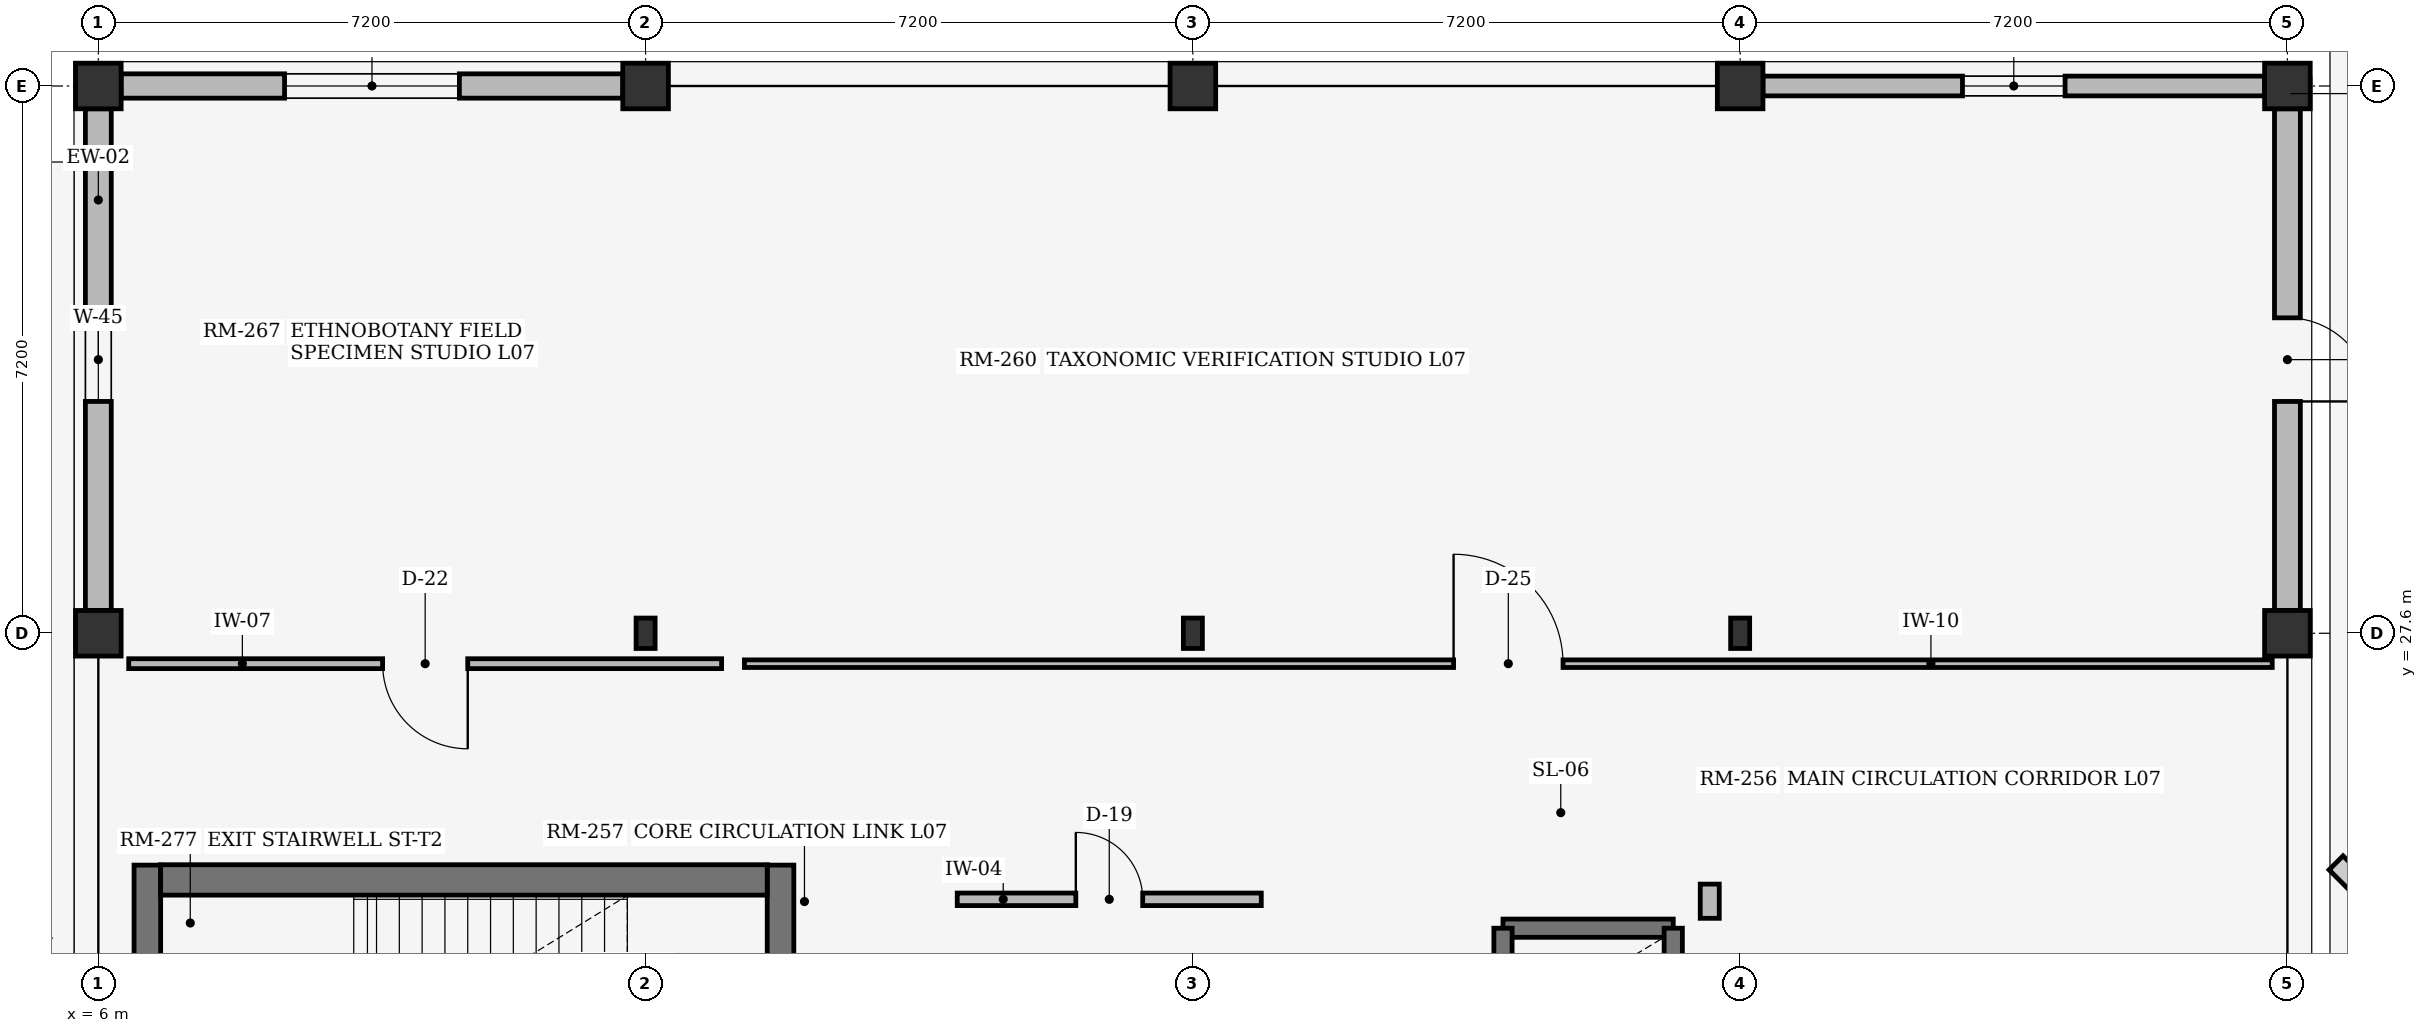
"""IFC4 building model, lengths in metres.
Left out: names, types, materials, properties, quantities, classifications, styles, units other than length and angle.
Written with IfcOpenShell. Run it as: python <this file> out.ifc"""

import sys

from ifc_helpers import new_model, si_unit, direction, frame, frame_2d, origin, origin_2d, place, context, subcontext, project, spatial, rectangle, i_section, extrude, element, fill, save


model = new_model("IFC4")
c1 = context("Model", 3, precision=1e-05, world=origin(), true_north=direction((0.0, 1.0)))
c2 = subcontext(c1, "Body", "Model", "MODEL_VIEW")
j1 = project(units=[si_unit("LENGTHUNIT", "METRE"), si_unit("PLANEANGLEUNIT", "RADIAN")], contexts=[c1])
p1 = place(None, origin())
s1 = spatial("IfcSite", under=j1, at=p1, CompositionType="ELEMENT")
p2 = place(p1, origin())
s2 = spatial("IfcBuilding", under=s1, at=p2, CompositionType="ELEMENT")
p3 = place(p2, frame((0.0, 0.0, 28.8)))
s3 = spatial("IfcBuildingStorey", under=s2, at=p3, CompositionType="ELEMENT", Elevation=28.8)
for number, where, z_axis, x_axis in (
    (1, (6.0, 27.6, 0.0), (0.0, 0.0, 1.0), (1.0, 0.0, 0.0)),
    (2, (6.0, 34.8, 0.0), (0.0, 0.0, 1.0), (1.0, 0.0, 0.0)),
):
    element("IfcColumn", number, at=place(p3, frame(where, z_axis=z_axis, x_axis=x_axis)), inside=s3, PredefinedType="COLUMN", context=c2, shape_type="SweptSolid", body=[
        extrude(rectangle(XDim=0.6, YDim=0.6, at=origin_2d()), origin(), (0.0, 0.0, 1.0), 3.62),
    ])
p4 = place(p3, frame((13.2, 27.6, 0.0), z_axis=(0.0, 0.0, 1.0), x_axis=(1.0, 0.0, 0.0)))
e3 = element("IfcColumn", 3, at=p4, inside=s3, PredefinedType="COLUMN", context=c2, shape_type="SweptSolid", body=[
    extrude(i_section(OverallWidth=0.25, OverallDepth=0.4, WebThickness=0.01, FlangeThickness=0.013, at=origin_2d()), origin(), (0.0, 0.0, 1.0), 3.62),
])
p5 = place(p3, frame((13.2, 34.8, 0.0), z_axis=(0.0, 0.0, 1.0), x_axis=(1.0, 0.0, 0.0)))
e4 = element("IfcColumn", 4, at=p5, inside=s3, PredefinedType="COLUMN", context=c2, shape_type="SweptSolid", body=[
    extrude(rectangle(XDim=0.6, YDim=0.6, at=origin_2d()), origin(), (0.0, 0.0, 1.0), 3.62),
])
p6 = place(p3, frame((20.4, 27.6, 0.0), z_axis=(0.0, 0.0, 1.0), x_axis=(1.0, 0.0, 0.0)))
e5 = element("IfcColumn", 5, at=p6, inside=s3, PredefinedType="COLUMN", context=c2, shape_type="SweptSolid", body=[
    extrude(i_section(OverallWidth=0.25, OverallDepth=0.4, WebThickness=0.01, FlangeThickness=0.013, at=origin_2d()), origin(), (0.0, 0.0, 1.0), 3.62),
])
p7 = place(p3, frame((20.4, 34.8, 0.0), z_axis=(0.0, 0.0, 1.0), x_axis=(1.0, 0.0, 0.0)))
e6 = element("IfcColumn", 6, at=p7, inside=s3, PredefinedType="COLUMN", context=c2, shape_type="SweptSolid", body=[
    extrude(rectangle(XDim=0.6, YDim=0.6, at=origin_2d()), origin(), (0.0, 0.0, 1.0), 3.62),
])
p8 = place(p3, frame((27.6, 27.6, 0.0), z_axis=(0.0, 0.0, 1.0), x_axis=(1.0, 0.0, 0.0)))
e7 = element("IfcColumn", 7, at=p8, inside=s3, PredefinedType="COLUMN", context=c2, shape_type="SweptSolid", body=[
    extrude(i_section(OverallWidth=0.25, OverallDepth=0.4, WebThickness=0.01, FlangeThickness=0.013, at=origin_2d()), origin(), (0.0, 0.0, 1.0), 3.62),
])
for number, where, z_axis, x_axis in (
    (8, (27.6, 34.8, 0.0), (0.0, 0.0, 1.0), (1.0, 0.0, 0.0)),
    (9, (34.8, 27.6, 0.0), (0.0, 0.0, 1.0), (1.0, 0.0, 0.0)),
    (10, (34.8, 34.8, 0.0), (0.0, 0.0, 1.0), (1.0, 0.0, 0.0)),
):
    element("IfcColumn", number, at=place(p3, frame(where, z_axis=z_axis, x_axis=x_axis)), inside=s3, PredefinedType="COLUMN", context=c2, shape_type="SweptSolid", body=[
        extrude(rectangle(XDim=0.6, YDim=0.6, at=origin_2d()), origin(), (0.0, 0.0, 1.0), 3.62),
    ])
p9 = place(p3, frame((6.3, 34.8, 0.0), z_axis=(0.0, 0.0, 1.0), x_axis=(1.0, 0.0, 0.0)))
e11 = element("IfcWall", 11, at=p9, inside=s3, PredefinedType="STANDARD", context=c2, shape_type="SweptSolid", body=[
    extrude(rectangle(XDim=6.6, YDim=0.32, at=frame_2d((3.3, 0.0))), origin(), (0.0, 0.0, 1.0), 3.1),
])
p10 = place(p9, frame((2.15, 0.0, 0.75)))
e12 = element("IfcOpeningElement", 12, at=p10, cuts=e11, PredefinedType="OPENING", context=c2, shape_type="SweptSolid", body=[
    extrude(rectangle(XDim=2.3, YDim=1.35, at=frame_2d((1.15, 0.675))), frame((0.0, 0.17, 0.0), z_axis=(0.0, -1.0, 0.0), x_axis=(1.0, 0.0, 0.0)), (0.0, 0.0, 1.0), 0.34),
])
p11 = place(p3, frame((27.9, 34.8, 0.0), z_axis=(0.0, 0.0, 1.0), x_axis=(1.0, 0.0, 0.0)))
e13 = element("IfcWall", 13, at=p11, inside=s3, PredefinedType="STANDARD", context=c2, shape_type="SweptSolid", body=[
    extrude(rectangle(XDim=6.6, YDim=0.26, at=frame_2d((3.3, 0.0))), origin(), (0.0, 0.0, 1.0), 3.1),
])
p12 = place(p11, frame((2.625, 0.0, 0.75)))
e14 = element("IfcOpeningElement", 14, at=p12, cuts=e13, PredefinedType="OPENING", context=c2, shape_type="SweptSolid", body=[
    extrude(rectangle(XDim=1.35, YDim=1.5, at=frame_2d((0.675, 0.75))), frame((0.0, 0.14, 0.0), z_axis=(0.0, -1.0, 0.0), x_axis=(1.0, 0.0, 0.0)), (0.0, 0.0, 1.0), 0.28),
])
p13 = place(p3, frame((6.0, 27.9, 0.0), z_axis=(0.0, 0.0, 1.0), x_axis=(0.0, 1.0, 0.0)))
e15 = element("IfcWall", 15, at=p13, inside=s3, PredefinedType="STANDARD", context=c2, shape_type="SweptSolid", body=[
    extrude(rectangle(XDim=6.6, YDim=0.34, at=frame_2d((3.3, 0.0))), origin(), (0.0, 0.0, 1.0), 3.1),
])
p14 = place(p13, frame((2.75, 0.0, 0.75)))
e16 = element("IfcOpeningElement", 16, at=p14, cuts=e15, PredefinedType="OPENING", context=c2, shape_type="SweptSolid", body=[
    extrude(rectangle(XDim=1.1, YDim=1.25, at=frame_2d((0.55, 0.625))), frame((0.0, 0.18, 0.0), z_axis=(0.0, -1.0, 0.0), x_axis=(1.0, 0.0, 0.0)), (0.0, 0.0, 1.0), 0.36),
])
p15 = place(p3, frame((34.8, 27.9, 0.0), z_axis=(0.0, 0.0, 1.0), x_axis=(0.0, 1.0, 0.0)))
e17 = element("IfcWall", 17, at=p15, inside=s3, PredefinedType="STANDARD", context=c2, shape_type="SweptSolid", body=[
    extrude(rectangle(XDim=6.6, YDim=0.34, at=frame_2d((3.3, 0.0))), origin(), (0.0, 0.0, 1.0), 3.1),
])
p16 = place(p15, frame((2.75, 0.0, 0.0)))
e18 = element("IfcOpeningElement", 18, at=p16, cuts=e17, PredefinedType="OPENING", context=c2, shape_type="SweptSolid", body=[
    extrude(rectangle(XDim=1.1, YDim=2.15, at=frame_2d((0.55, 1.075))), frame((0.0, 0.18, 0.0), z_axis=(0.0, -1.0, 0.0), x_axis=(1.0, 0.0, 0.0)), (0.0, 0.0, 1.0), 0.36),
])
p17 = place(p3, frame((14.975, 24.55, 0.0), z_axis=(0.0, 0.0, 1.0), x_axis=(0.0, -1.0, 0.0)))
e19 = element("IfcWall", 19, at=p17, inside=s3, PredefinedType="SHEAR", context=c2, shape_type="SweptSolid", body=[
    extrude(rectangle(XDim=4.59, YDim=0.35, at=frame_2d((2.295, 0.0))), origin(), (0.0, 0.0, 1.0), 3.62),
])
p18 = place(p17, frame((1.72, 0.0, 0.0)))
e20 = element("IfcOpeningElement", 20, at=p18, cuts=e19, PredefinedType="OPENING", context=c2, shape_type="SweptSolid", body=[
    extrude(rectangle(XDim=1.15, YDim=2.2, at=frame_2d((0.575, 1.1))), frame((0.0, 0.185, 0.0), z_axis=(0.0, -1.0, 0.0), x_axis=(1.0, 0.0, 0.0)), (0.0, 0.0, 1.0), 0.37),
])
p19 = place(p3, frame((6.645, 24.55, 0.0), z_axis=(0.0, 0.0, 1.0), x_axis=(0.0, -1.0, 0.0)))
e21 = element("IfcWall", 21, at=p19, inside=s3, PredefinedType="SHEAR", context=c2, shape_type="SweptSolid", body=[
    extrude(rectangle(XDim=4.59, YDim=0.35, at=frame_2d((2.295, 0.0))), origin(), (0.0, 0.0, 1.0), 3.62),
])
p20 = place(p3, frame((14.8, 24.355, 0.0), z_axis=(0.0, 0.0, 1.0), x_axis=(-1.0, 0.0, 0.0)))
e22 = element("IfcWall", 22, at=p20, inside=s3, PredefinedType="SHEAR", context=c2, shape_type="SweptSolid", body=[
    extrude(rectangle(XDim=7.98, YDim=0.4, at=frame_2d((3.99, 0.0))), origin(), (0.0, 0.0, 1.0), 3.62),
])
p21 = place(p3, frame((24.48, 23.72, 0.0), z_axis=(0.0, 0.0, 1.0), x_axis=(1.0, 0.0, 0.0)))
e23 = element("IfcWall", 23, at=p21, inside=s3, PredefinedType="SHEAR", context=c2, shape_type="SweptSolid", body=[
    extrude(rectangle(XDim=2.24, YDim=0.24, at=frame_2d((1.12, 0.0))), origin(), (0.0, 0.0, 1.0), 3.62),
])
for number, where, z_axis, x_axis in (
    (24, (24.48, 20.78, 0.0), (0.0, 0.0, 1.0), (0.0, 1.0, 0.0)),
    (25, (26.72, 20.78, 0.0), (0.0, 0.0, 1.0), (0.0, 1.0, 0.0)),
):
    element("IfcWall", number, at=place(p3, frame(where, z_axis=z_axis, x_axis=x_axis)), inside=s3, PredefinedType="SHEAR", context=c2, shape_type="SweptSolid", body=[
        extrude(rectangle(XDim=2.94, YDim=0.24, at=frame_2d((1.47, 0.0))), origin(), (0.0, 0.0, 1.0), 3.62),
    ])
p22 = place(p3, frame((17.3, 24.1, 0.0), z_axis=(0.0, 0.0, 1.0), x_axis=(1.0, 0.0, 0.0)))
e26 = element("IfcWall", 26, at=p22, inside=s3, PredefinedType="PARTITIONING", context=c2, shape_type="SweptSolid", body=[
    extrude(rectangle(XDim=4.0, YDim=0.165, at=frame_2d((2.0, 0.0))), origin(), (0.0, 0.0, 1.0), 3.6),
])
p23 = place(p22, frame((1.56, 0.0, 0.0)))
e27 = element("IfcOpeningElement", 27, at=p23, cuts=e26, PredefinedType="OPENING", context=c2, shape_type="SweptSolid", body=[
    extrude(rectangle(XDim=0.88, YDim=2.12, at=frame_2d((0.44, 1.06))), frame((0.0, 0.093, 0.0), z_axis=(0.0, -1.0, 0.0), x_axis=(1.0, 0.0, 0.0)), (0.0, 0.0, 1.0), 0.185),
])
p24 = place(p3, frame((6.4, 27.2, 0.0), z_axis=(0.0, 0.0, 1.0), x_axis=(1.0, 0.0, 0.0)))
e28 = element("IfcWall", 28, at=p24, inside=s3, PredefinedType="PARTITIONING", context=c2, shape_type="SweptSolid", body=[
    extrude(rectangle(XDim=7.8, YDim=0.13, at=frame_2d((3.9, 0.0))), origin(), (0.0, 0.0, 1.0), 3.6),
])
p25 = place(p24, frame((3.34, 0.0, 0.0)))
e29 = element("IfcOpeningElement", 29, at=p25, cuts=e28, PredefinedType="OPENING", context=c2, shape_type="SweptSolid", body=[
    extrude(rectangle(XDim=1.12, YDim=2.22, at=frame_2d((0.56, 1.11))), frame((0.0, 0.075, 0.0), z_axis=(0.0, -1.0, 0.0), x_axis=(1.0, 0.0, 0.0)), (0.0, 0.0, 1.0), 0.15),
])
p26 = place(p3, frame((27.2, 24.3, 0.0), z_axis=(0.0, 0.0, 1.0), x_axis=(0.0, -1.0, 0.0)))
e30 = element("IfcWall", 30, at=p26, inside=s3, PredefinedType="SOLIDWALL", context=c2, shape_type="SweptSolid", body=[
    extrude(rectangle(XDim=0.45, YDim=0.25, at=frame_2d((0.225, 0.0))), origin(), (0.0, 0.0, 1.0), 3.6),
])
p27 = place(p3, frame((14.5, 27.2, 0.0), z_axis=(0.0, 0.0, 1.0), x_axis=(1.0, 0.0, 0.0)))
e31 = element("IfcWall", 31, at=p27, inside=s3, PredefinedType="PARTITIONING", context=c2, shape_type="SweptSolid", body=[
    extrude(rectangle(XDim=20.1, YDim=0.1, at=frame_2d((10.05, 0.0))), origin(), (0.0, 0.0, 1.0), 3.6),
])
p28 = place(p27, frame((9.33, 0.0, 0.0)))
e32 = element("IfcOpeningElement", 32, at=p28, cuts=e31, PredefinedType="OPENING", context=c2, shape_type="SweptSolid", body=[
    extrude(rectangle(XDim=1.44, YDim=2.24, at=frame_2d((0.72, 1.12))), frame((0.0, 0.06, 0.0), z_axis=(0.0, -1.0, 0.0), x_axis=(1.0, 0.0, 0.0)), (0.0, 0.0, 1.0), 0.12),
])
p29 = place(p10, origin())
e33 = element("IfcWindow", 33, at=p29, inside=s3, PartitioningType="SINGLE_PANEL", PredefinedType="WINDOW", context=c2, shape_type="SweptSolid", body=[
    extrude(rectangle(XDim=2.3, YDim=1.35, at=frame_2d((1.15, 0.675))), frame((0.0, 0.03, 0.0), z_axis=(0.0, -1.0, 0.0), x_axis=(1.0, 0.0, 0.0)), (0.0, 0.0, 1.0), 0.06),
])
fill(e12, e33)
p30 = place(p12, origin())
e34 = element("IfcWindow", 34, at=p30, inside=s3, PartitioningType="SINGLE_PANEL", PredefinedType="WINDOW", context=c2, shape_type="SweptSolid", body=[
    extrude(rectangle(XDim=1.35, YDim=1.5, at=frame_2d((0.675, 0.75))), frame((0.0, 0.03, 0.0), z_axis=(0.0, -1.0, 0.0), x_axis=(1.0, 0.0, 0.0)), (0.0, 0.0, 1.0), 0.06),
])
fill(e14, e34)
p31 = place(p14, origin())
e35 = element("IfcWindow", 35, at=p31, inside=s3, PartitioningType="SINGLE_PANEL", PredefinedType="WINDOW", context=c2, shape_type="SweptSolid", body=[
    extrude(rectangle(XDim=1.1, YDim=1.25, at=frame_2d((0.55, 0.625))), frame((0.0, 0.03, 0.0), z_axis=(0.0, -1.0, 0.0), x_axis=(1.0, 0.0, 0.0)), (0.0, 0.0, 1.0), 0.06),
])
fill(e16, e35)
p32 = place(p16, frame((1.1, 0.0, 0.0), z_axis=(0.0, 0.0, 1.0), x_axis=(-1.0, 0.0, 0.0)))
e36 = element("IfcDoor", 36, at=p32, inside=s3, OperationType="SINGLE_SWING_LEFT", PredefinedType="DOOR", context=c2, shape_type="SweptSolid", body=[
    extrude(rectangle(XDim=1.1, YDim=2.15, at=frame_2d((0.55, 1.075))), frame((0.0, 0.025, 0.0), z_axis=(0.0, -1.0, 0.0), x_axis=(1.0, 0.0, 0.0)), (0.0, 0.0, 1.0), 0.05),
])
fill(e18, e36)
p33 = place(p23, origin())
e37 = element("IfcDoor", 37, at=p33, inside=s3, OperationType="SINGLE_SWING_LEFT", PredefinedType="DOOR", context=c2, shape_type="SweptSolid", body=[
    extrude(rectangle(XDim=0.88, YDim=2.12, at=frame_2d((0.44, 1.06))), frame((0.0, 0.025, 0.0), z_axis=(0.0, -1.0, 0.0), x_axis=(1.0, 0.0, 0.0)), (0.0, 0.0, 1.0), 0.05),
])
fill(e27, e37)
p34 = place(p25, origin())
e38 = element("IfcDoor", 38, at=p34, inside=s3, OperationType="SINGLE_SWING_RIGHT", PredefinedType="DOOR", context=c2, shape_type="SweptSolid", body=[
    extrude(rectangle(XDim=1.12, YDim=2.22, at=frame_2d((0.56, 1.11))), frame((0.0, 0.025, 0.0), z_axis=(0.0, -1.0, 0.0), x_axis=(1.0, 0.0, 0.0)), (0.0, 0.0, 1.0), 0.05),
])
fill(e29, e38)
p35 = place(p28, origin())
e39 = element("IfcDoor", 39, at=p35, inside=s3, OperationType="SINGLE_SWING_LEFT", PredefinedType="DOOR", context=c2, shape_type="SweptSolid", body=[
    extrude(rectangle(XDim=1.44, YDim=2.24, at=frame_2d((0.72, 1.12))), frame((0.0, 0.025, 0.0), z_axis=(0.0, -1.0, 0.0), x_axis=(1.0, 0.0, 0.0)), (0.0, 0.0, 1.0), 0.05),
])
fill(e32, e39)
save(model, sys.argv[1])
